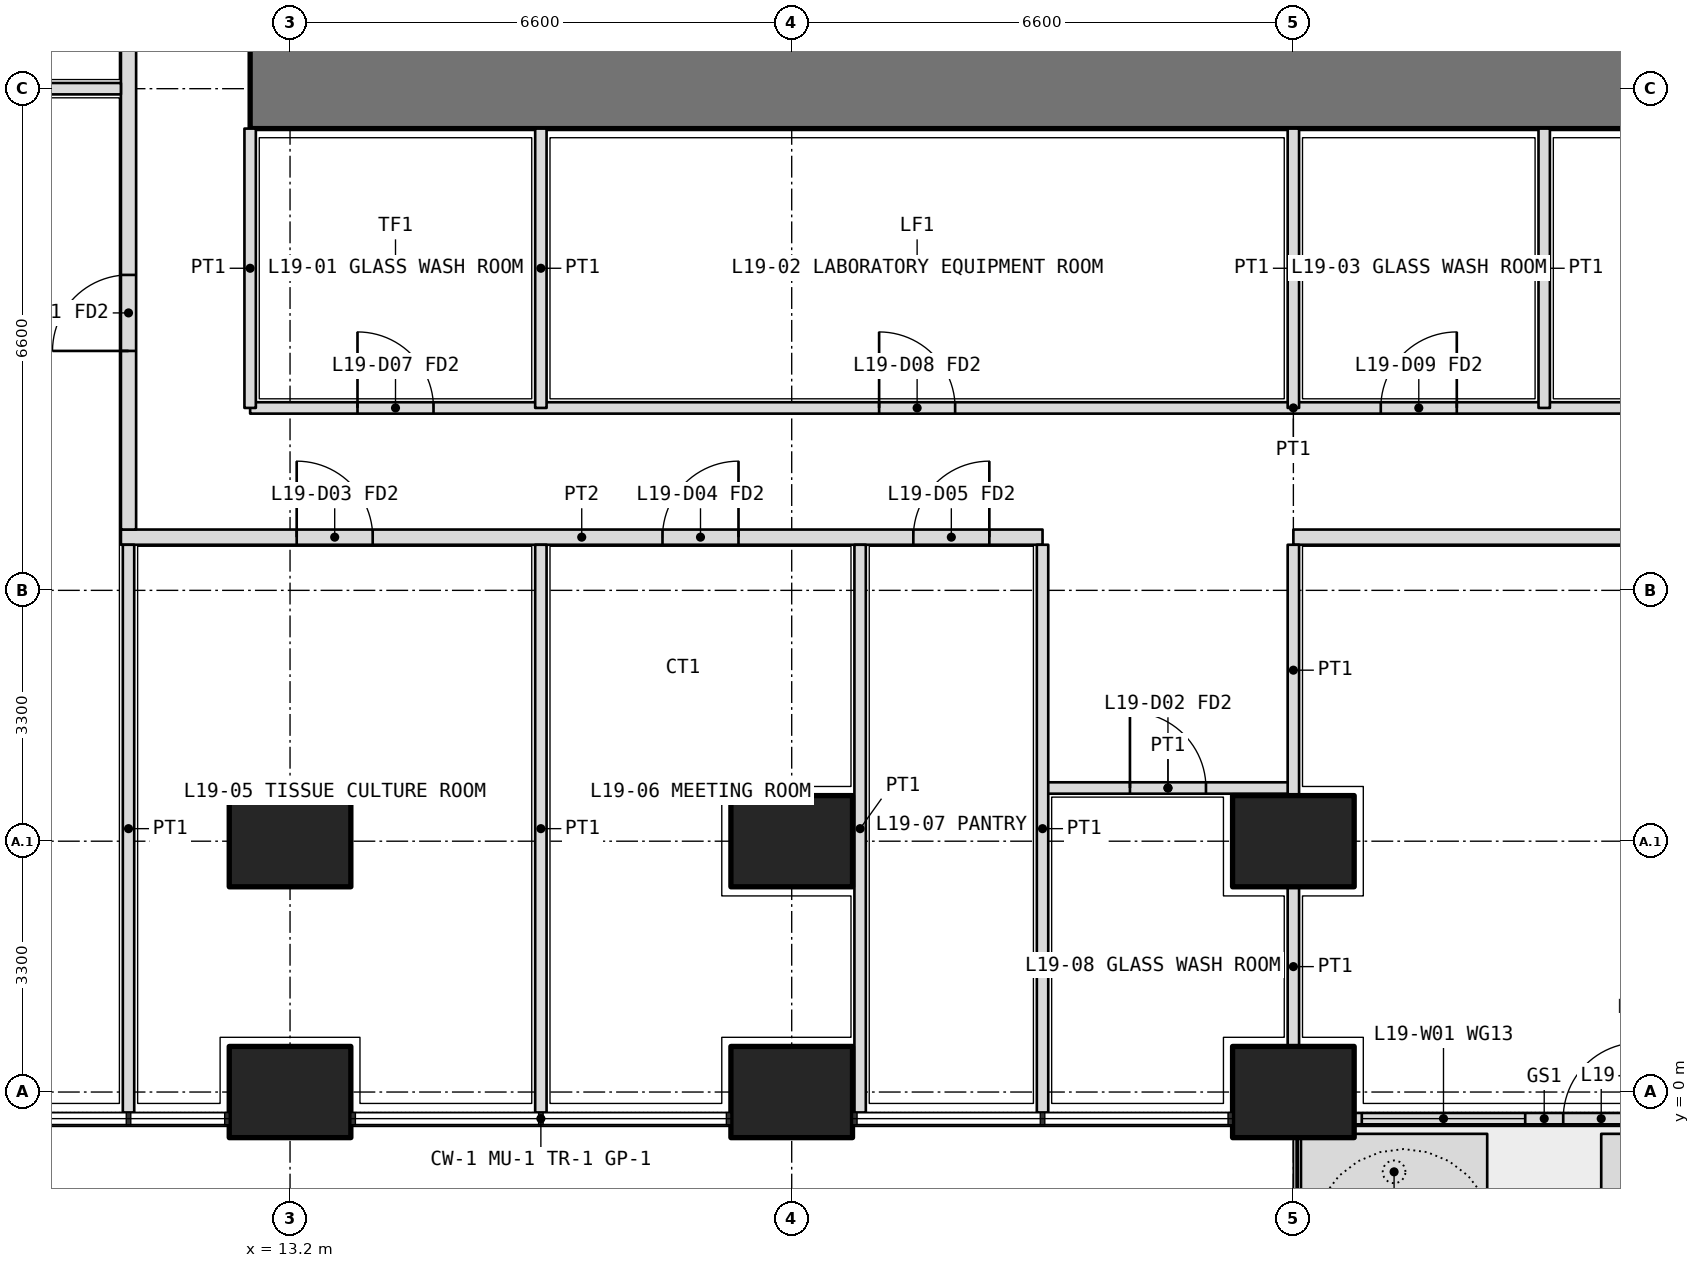
"""IFC4 building model, lengths in metres.
Left out: names, types, materials, properties, quantities, classifications, styles, units other than length and angle.
Written with IfcOpenShell. Run it as: python <this file> out.ifc"""

import sys

from ifc_helpers import new_model, si_unit, direction, frame, frame_2d, origin, origin_2d, place, context, subcontext, project, spatial, polyline, rectangle, outline, extrude, element, fill, save


model = new_model("IFC4")
c1 = context("Model", 3, precision=1e-05, world=origin(), true_north=direction((0.0, 1.0)))
c2 = subcontext(c1, "Body", "Model", "MODEL_VIEW")
j1 = project(units=[si_unit("LENGTHUNIT", "METRE"), si_unit("PLANEANGLEUNIT", "RADIAN")], contexts=[c1])
p1 = place(None, origin())
s1 = spatial("IfcSite", under=j1, at=p1, CompositionType="ELEMENT")
p2 = place(p1, origin())
s2 = spatial("IfcBuilding", under=s1, at=p2, CompositionType="ELEMENT")
p3 = place(p2, frame((0.0, 0.0, 86.4)))
s3 = spatial("IfcBuildingStorey", under=s2, at=p3, CompositionType="ELEMENT", Elevation=86.4)
for number, where, z_axis, x_axis in (
    (1, (13.2, 0.0, 0.0), (0.0, 0.0, 1.0), (1.0, 0.0, 0.0)),
    (2, (19.8, 0.0, 0.0), (0.0, 0.0, 1.0), (1.0, 0.0, 0.0)),
    (3, (26.4, 0.0, 0.0), (0.0, 0.0, 1.0), (1.0, 0.0, 0.0)),
    (4, (13.2, 3.3, 0.0), (0.0, 0.0, 1.0), (1.0, 0.0, 0.0)),
    (5, (19.8, 3.3, 0.0), (0.0, 0.0, 1.0), (1.0, 0.0, 0.0)),
    (6, (26.4, 3.3, 0.0), (0.0, 0.0, 1.0), (1.0, 0.0, 0.0)),
):
    element("IfcColumn", number, at=place(p3, frame(where, z_axis=z_axis, x_axis=x_axis)), inside=s3, PredefinedType="COLUMN", context=c2, shape_type="SweptSolid", body=[
        extrude(rectangle(XDim=1.6, YDim=1.2, at=origin_2d()), origin(), (0.0, 0.0, 1.0), 4.2),
    ])
p4 = place(p3, origin())
e7 = element("IfcWall", 7, at=p4, inside=s3, PredefinedType="USERDEFINED", context=c2, shape_type="SweptSolid", body=[
    extrude(outline(polyline([(26.5, -1.55), (28.95, -1.55), (28.95, -0.55), (26.5, -0.55), (26.5, -1.55)]), holes=[polyline([(26.65, -1.4), (28.8, -1.4), (28.8, -0.7), (26.65, -0.7), (26.65, -1.4)])]), origin(), (0.0, 0.0, 1.0), 1.05),
])
p5 = place(p3, origin())
e8 = element("IfcWall", 8, at=p5, inside=s3, PredefinedType="USERDEFINED", context=c2, shape_type="SweptSolid", body=[
    extrude(outline(polyline([(30.45, -1.55), (39.5, -1.55), (39.5, -0.55), (30.45, -0.55), (30.45, -1.55)]), holes=[polyline([(30.6, -1.4), (39.35, -1.4), (39.35, -0.7), (30.6, -0.7), (30.6, -1.4)])]), origin(), (0.0, 0.0, 1.0), 1.05),
])
p6 = place(p3, frame((27.2, -0.35, 0.0), z_axis=(0.0, 0.0, 1.0), x_axis=(1.0, 0.0, 0.0)))
e9 = element("IfcWall", 9, at=p6, inside=s3, PredefinedType="SOLIDWALL", context=c2, shape_type="SweptSolid", body=[
    extrude(rectangle(XDim=5.0, YDim=0.15, at=frame_2d((2.5, 0.0))), origin(), (0.0, 0.0, 1.0), 2.7),
])
p7 = place(p6, frame((2.75, 0.0, 0.0)))
e10 = element("IfcOpeningElement", 10, at=p7, cuts=e9, PredefinedType="OPENING", context=c2, shape_type="SweptSolid", body=[
    extrude(rectangle(XDim=1.0, YDim=2.4, at=frame_2d((0.5, 1.2))), frame((0.0, 0.085, 0.0), z_axis=(0.0, -1.0, 0.0), x_axis=(1.0, 0.0, 0.0)), (0.0, 0.0, 1.0), 0.17),
])
p8 = place(p6, frame((0.1, 0.0, 0.1)))
e11 = element("IfcOpeningElement", 11, at=p8, cuts=e9, PredefinedType="OPENING", context=c2, shape_type="SweptSolid", body=[
    extrude(rectangle(XDim=2.15, YDim=2.3, at=frame_2d((1.075, 1.15))), frame((0.0, 0.085, 0.0), z_axis=(0.0, -1.0, 0.0), x_axis=(1.0, 0.0, 0.0)), (0.0, 0.0, 1.0), 0.17),
])
p9 = place(p6, frame((3.85, 0.0, 0.1)))
e12 = element("IfcOpeningElement", 12, at=p9, cuts=e9, PredefinedType="OPENING", context=c2, shape_type="SweptSolid", body=[
    extrude(rectangle(XDim=1.05, YDim=2.3, at=frame_2d((0.525, 1.15))), frame((0.0, 0.085, 0.0), z_axis=(0.0, -1.0, 0.0), x_axis=(1.0, 0.0, 0.0)), (0.0, 0.0, 1.0), 0.17),
])
p10 = place(p3, frame((12.675, 13.2, 0.0), z_axis=(0.0, 0.0, 1.0), x_axis=(1.0, 0.0, 0.0)))
e13 = element("IfcWall", 13, at=p10, inside=s3, PredefinedType="SHEAR", context=c2, shape_type="SweptSolid", body=[
    extrude(rectangle(XDim=27.45, YDim=1.05, at=frame_2d((13.725, 0.0))), origin(), (0.0, 0.0, 1.0), 4.2),
])
p11 = place(p3, frame((12.675, 9.0, 0.0), z_axis=(0.0, 0.0, 1.0), x_axis=(1.0, 0.0, 0.0)))
e14 = element("IfcWall", 14, at=p11, inside=s3, PredefinedType="PARTITIONING", context=c2, shape_type="SweptSolid", body=[
    extrude(rectangle(XDim=27.45, YDim=0.15, at=frame_2d((13.725, 0.0))), origin(), (0.0, 0.0, 1.0), 2.85),
])
p12 = place(p11, frame((1.413, 0.0, 0.0)))
e15 = element("IfcOpeningElement", 15, at=p12, cuts=e14, PredefinedType="OPENING", context=c2, shape_type="SweptSolid", body=[
    extrude(rectangle(XDim=1.0, YDim=2.1, at=frame_2d((0.5, 1.05))), frame((0.0, 0.085, 0.0), z_axis=(0.0, -1.0, 0.0), x_axis=(1.0, 0.0, 0.0)), (0.0, 0.0, 1.0), 0.17),
])
p13 = place(p11, frame((8.275, 0.0, 0.0)))
e16 = element("IfcOpeningElement", 16, at=p13, cuts=e14, PredefinedType="OPENING", context=c2, shape_type="SweptSolid", body=[
    extrude(rectangle(XDim=1.0, YDim=2.1, at=frame_2d((0.5, 1.05))), frame((0.0, 0.085, 0.0), z_axis=(0.0, -1.0, 0.0), x_axis=(1.0, 0.0, 0.0)), (0.0, 0.0, 1.0), 0.17),
])
p14 = place(p11, frame((14.875, 0.0, 0.0)))
e17 = element("IfcOpeningElement", 17, at=p14, cuts=e14, PredefinedType="OPENING", context=c2, shape_type="SweptSolid", body=[
    extrude(rectangle(XDim=1.0, YDim=2.1, at=frame_2d((0.5, 1.05))), frame((0.0, 0.085, 0.0), z_axis=(0.0, -1.0, 0.0), x_axis=(1.0, 0.0, 0.0)), (0.0, 0.0, 1.0), 0.17),
])
p15 = place(p11, frame((21.738, 0.0, 0.0)))
e18 = element("IfcOpeningElement", 18, at=p15, cuts=e14, PredefinedType="OPENING", context=c2, shape_type="SweptSolid", body=[
    extrude(rectangle(XDim=1.0, YDim=2.1, at=frame_2d((0.5, 1.05))), frame((0.0, 0.085, 0.0), z_axis=(0.0, -1.0, 0.0), x_axis=(1.0, 0.0, 0.0)), (0.0, 0.0, 1.0), 0.17),
])
p16 = place(p3, frame((12.675, 12.675, 0.0), z_axis=(0.0, 0.0, 1.0), x_axis=(0.0, -1.0, 0.0)))
e19 = element("IfcWall", 19, at=p16, inside=s3, PredefinedType="PARTITIONING", context=c2, shape_type="SweptSolid", body=[
    extrude(rectangle(XDim=3.675, YDim=0.15, at=frame_2d((1.837, 0.0))), origin(), (0.0, 0.0, 1.0), 2.85),
])
p17 = place(p3, frame((16.5, 12.675, 0.0), z_axis=(0.0, 0.0, 1.0), x_axis=(0.0, -1.0, 0.0)))
e20 = element("IfcWall", 20, at=p17, inside=s3, PredefinedType="PARTITIONING", context=c2, shape_type="SweptSolid", body=[
    extrude(rectangle(XDim=3.675, YDim=0.15, at=frame_2d((1.837, 0.0))), origin(), (0.0, 0.0, 1.0), 3.9),
])
p18 = place(p3, frame((26.4, 12.675, 0.0), z_axis=(0.0, 0.0, 1.0), x_axis=(0.0, -1.0, 0.0)))
e21 = element("IfcWall", 21, at=p18, inside=s3, PredefinedType="PARTITIONING", context=c2, shape_type="SweptSolid", body=[
    extrude(rectangle(XDim=3.675, YDim=0.15, at=frame_2d((1.837, 0.0))), origin(), (0.0, 0.0, 1.0), 2.85),
])
p19 = place(p3, frame((29.7, 12.675, 0.0), z_axis=(0.0, 0.0, 1.0), x_axis=(0.0, -1.0, 0.0)))
e22 = element("IfcWall", 22, at=p19, inside=s3, PredefinedType="PARTITIONING", context=c2, shape_type="SweptSolid", body=[
    extrude(rectangle(XDim=3.675, YDim=0.15, at=frame_2d((1.837, 0.0))), origin(), (0.0, 0.0, 1.0), 3.9),
])
p20 = place(p3, frame((10.975, 7.3, 0.0), z_axis=(0.0, 0.0, 1.0), x_axis=(1.0, 0.0, 0.0)))
e23 = element("IfcWall", 23, at=p20, inside=s3, PredefinedType="PARTITIONING", context=c2, shape_type="SweptSolid", body=[
    extrude(rectangle(XDim=12.125, YDim=0.2, at=frame_2d((6.062, 0.0))), origin(), (0.0, 0.0, 1.0), 2.85),
])
p21 = place(p20, frame((2.312, 0.0, 0.0)))
e24 = element("IfcOpeningElement", 24, at=p21, cuts=e23, PredefinedType="OPENING", context=c2, shape_type="SweptSolid", body=[
    extrude(rectangle(XDim=1.0, YDim=2.1, at=frame_2d((0.5, 1.05))), frame((0.0, 0.11, 0.0), z_axis=(0.0, -1.0, 0.0), x_axis=(1.0, 0.0, 0.0)), (0.0, 0.0, 1.0), 0.22),
])
p22 = place(p20, frame((7.125, 0.0, 0.0)))
e25 = element("IfcOpeningElement", 25, at=p22, cuts=e23, PredefinedType="OPENING", context=c2, shape_type="SweptSolid", body=[
    extrude(rectangle(XDim=1.0, YDim=2.1, at=frame_2d((0.5, 1.05))), frame((0.0, 0.11, 0.0), z_axis=(0.0, -1.0, 0.0), x_axis=(1.0, 0.0, 0.0)), (0.0, 0.0, 1.0), 0.22),
])
p23 = place(p20, frame((10.425, 0.0, 0.0)))
e26 = element("IfcOpeningElement", 26, at=p23, cuts=e23, PredefinedType="OPENING", context=c2, shape_type="SweptSolid", body=[
    extrude(rectangle(XDim=1.0, YDim=2.1, at=frame_2d((0.5, 1.05))), frame((0.0, 0.11, 0.0), z_axis=(0.0, -1.0, 0.0), x_axis=(1.0, 0.0, 0.0)), (0.0, 0.0, 1.0), 0.22),
])
p24 = place(p3, frame((26.4, 7.3, 0.0), z_axis=(0.0, 0.0, 1.0), x_axis=(1.0, 0.0, 0.0)))
e27 = element("IfcWall", 27, at=p24, inside=s3, PredefinedType="PARTITIONING", context=c2, shape_type="SweptSolid", body=[
    extrude(rectangle(XDim=15.425, YDim=0.2, at=frame_2d((7.712, 0.0))), origin(), (0.0, 0.0, 1.0), 2.85),
])
p25 = place(p24, frame((7.163, 0.0, 0.0)))
e28 = element("IfcOpeningElement", 28, at=p25, cuts=e27, PredefinedType="OPENING", context=c2, shape_type="SweptSolid", body=[
    extrude(rectangle(XDim=1.0, YDim=2.1, at=frame_2d((0.5, 1.05))), frame((0.0, 0.11, 0.0), z_axis=(0.0, -1.0, 0.0), x_axis=(1.0, 0.0, 0.0)), (0.0, 0.0, 1.0), 0.22),
])
p26 = place(p3, frame((11.075, 7.4, 0.0), z_axis=(0.0, 0.0, 1.0), x_axis=(0.0, 1.0, 0.0)))
e29 = element("IfcWall", 29, at=p26, inside=s3, PredefinedType="PARTITIONING", context=c2, shape_type="SweptSolid", body=[
    extrude(rectangle(XDim=27.625, YDim=0.2, at=frame_2d((13.812, 0.0))), origin(), (0.0, 0.0, 1.0), 2.85),
])
p27 = place(p26, frame((2.35, 0.0, 0.0)))
e30 = element("IfcOpeningElement", 30, at=p27, cuts=e29, PredefinedType="OPENING", context=c2, shape_type="SweptSolid", body=[
    extrude(rectangle(XDim=1.0, YDim=2.1, at=frame_2d((0.5, 1.05))), frame((0.0, 0.11, 0.0), z_axis=(0.0, -1.0, 0.0), x_axis=(1.0, 0.0, 0.0)), (0.0, 0.0, 1.0), 0.22),
])
p28 = place(p26, frame((6.35, 0.0, 0.0)))
e31 = element("IfcOpeningElement", 31, at=p28, cuts=e29, PredefinedType="OPENING", context=c2, shape_type="SweptSolid", body=[
    extrude(rectangle(XDim=1.0, YDim=2.1, at=frame_2d((0.5, 1.05))), frame((0.0, 0.11, 0.0), z_axis=(0.0, -1.0, 0.0), x_axis=(1.0, 0.0, 0.0)), (0.0, 0.0, 1.0), 0.22),
])
p29 = place(p26, frame((9.425, 0.0, 0.0)))
e32 = element("IfcOpeningElement", 32, at=p29, cuts=e29, PredefinedType="OPENING", context=c2, shape_type="SweptSolid", body=[
    extrude(rectangle(XDim=0.9, YDim=2.1, at=frame_2d((0.45, 1.05))), frame((0.0, 0.11, 0.0), z_axis=(0.0, -1.0, 0.0), x_axis=(1.0, 0.0, 0.0)), (0.0, 0.0, 1.0), 0.22),
])
p30 = place(p26, frame((13.275, 0.0, 0.0)))
e33 = element("IfcOpeningElement", 33, at=p30, cuts=e29, PredefinedType="OPENING", context=c2, shape_type="SweptSolid", body=[
    extrude(rectangle(XDim=0.9, YDim=2.1, at=frame_2d((0.45, 1.05))), frame((0.0, 0.11, 0.0), z_axis=(0.0, -1.0, 0.0), x_axis=(1.0, 0.0, 0.0)), (0.0, 0.0, 1.0), 0.22),
])
p31 = place(p26, frame((16.8, 0.0, 0.0)))
e34 = element("IfcOpeningElement", 34, at=p31, cuts=e29, PredefinedType="OPENING", context=c2, shape_type="SweptSolid", body=[
    extrude(rectangle(XDim=1.0, YDim=2.1, at=frame_2d((0.5, 1.05))), frame((0.0, 0.11, 0.0), z_axis=(0.0, -1.0, 0.0), x_axis=(1.0, 0.0, 0.0)), (0.0, 0.0, 1.0), 0.22),
])
p32 = place(p26, frame((20.15, 0.0, 0.0)))
e35 = element("IfcOpeningElement", 35, at=p32, cuts=e29, PredefinedType="OPENING", context=c2, shape_type="SweptSolid", body=[
    extrude(rectangle(XDim=1.0, YDim=2.1, at=frame_2d((0.5, 1.05))), frame((0.0, 0.11, 0.0), z_axis=(0.0, -1.0, 0.0), x_axis=(1.0, 0.0, 0.0)), (0.0, 0.0, 1.0), 0.22),
])
p33 = place(p26, frame((23.45, 0.0, 0.0)))
e36 = element("IfcOpeningElement", 36, at=p33, cuts=e29, PredefinedType="OPENING", context=c2, shape_type="SweptSolid", body=[
    extrude(rectangle(XDim=1.0, YDim=2.1, at=frame_2d((0.5, 1.05))), frame((0.0, 0.11, 0.0), z_axis=(0.0, -1.0, 0.0), x_axis=(1.0, 0.0, 0.0)), (0.0, 0.0, 1.0), 0.22),
])
p34 = place(p26, frame((26.163, 0.0, 0.0)))
e37 = element("IfcOpeningElement", 37, at=p34, cuts=e29, PredefinedType="OPENING", context=c2, shape_type="SweptSolid", body=[
    extrude(rectangle(XDim=1.0, YDim=2.1, at=frame_2d((0.5, 1.05))), frame((0.0, 0.11, 0.0), z_axis=(0.0, -1.0, 0.0), x_axis=(1.0, 0.0, 0.0)), (0.0, 0.0, 1.0), 0.22),
])
for number, where, z_axis, x_axis in (
    (38, (11.075, -0.27, 0.0), (0.0, 0.0, 1.0), (0.0, 1.0, 0.0)),
    (39, (20.7, -0.27, 0.0), (0.0, 0.0, 1.0), (0.0, 1.0, 0.0)),
):
    element("IfcWall", number, at=place(p3, frame(where, z_axis=z_axis, x_axis=x_axis)), inside=s3, PredefinedType="PARTITIONING", context=c2, shape_type="SweptSolid", body=[
        extrude(rectangle(XDim=7.47, YDim=0.15, at=frame_2d((3.735, 0.0))), origin(), (0.0, 0.0, 1.0), 2.7),
    ])
p35 = place(p3, frame((23.1, 4.0, 0.0), z_axis=(0.0, 0.0, 1.0), x_axis=(1.0, 0.0, 0.0)))
e40 = element("IfcWall", 40, at=p35, inside=s3, PredefinedType="PARTITIONING", context=c2, shape_type="SweptSolid", body=[
    extrude(rectangle(XDim=3.3, YDim=0.15, at=frame_2d((1.65, 0.0))), origin(), (0.0, 0.0, 1.0), 2.85),
])
p36 = place(p35, frame((1.15, 0.0, 0.0)))
e41 = element("IfcOpeningElement", 41, at=p36, cuts=e40, PredefinedType="OPENING", context=c2, shape_type="SweptSolid", body=[
    extrude(rectangle(XDim=1.0, YDim=2.1, at=frame_2d((0.5, 1.05))), frame((0.0, 0.085, 0.0), z_axis=(0.0, -1.0, 0.0), x_axis=(1.0, 0.0, 0.0)), (0.0, 0.0, 1.0), 0.17),
])
for number, where, z_axis, x_axis in (
    (42, (16.5, -0.27, 0.0), (0.0, 0.0, 1.0), (0.0, 1.0, 0.0)),
    (43, (23.1, -0.27, 0.0), (0.0, 0.0, 1.0), (0.0, 1.0, 0.0)),
):
    element("IfcWall", number, at=place(p3, frame(where, z_axis=z_axis, x_axis=x_axis)), inside=s3, PredefinedType="PARTITIONING", context=c2, shape_type="SweptSolid", body=[
        extrude(rectangle(XDim=7.47, YDim=0.15, at=frame_2d((3.735, 0.0))), origin(), (0.0, 0.0, 1.0), 2.7),
    ])
p37 = place(p3, frame((26.4, 0.6, 0.0), z_axis=(0.0, 0.0, 1.0), x_axis=(0.0, 1.0, 0.0)))
e44 = element("IfcWall", 44, at=p37, inside=s3, PredefinedType="PARTITIONING", context=c2, shape_type="SweptSolid", body=[
    extrude(rectangle(XDim=2.1, YDim=0.15, at=frame_2d((1.05, 0.0))), origin(), (0.0, 0.0, 1.0), 2.85),
])
p38 = place(p3, frame((26.4, 3.9, 0.0), z_axis=(0.0, 0.0, 1.0), x_axis=(0.0, 1.0, 0.0)))
e45 = element("IfcWall", 45, at=p38, inside=s3, PredefinedType="PARTITIONING", context=c2, shape_type="SweptSolid", body=[
    extrude(rectangle(XDim=3.3, YDim=0.15, at=frame_2d((1.65, 0.0))), origin(), (0.0, 0.0, 1.0), 2.85),
])
p39 = place(p3, frame((7.2, 13.2, 0.0), z_axis=(0.0, 0.0, 1.0), x_axis=(1.0, 0.0, 0.0)))
e46 = element("IfcWall", 46, at=p39, inside=s3, PredefinedType="PARTITIONING", context=c2, shape_type="SweptSolid", body=[
    extrude(rectangle(XDim=3.775, YDim=0.15, at=frame_2d((1.888, 0.0))), origin(), (0.0, 0.0, 1.0), 2.85),
])
p40 = place(p7, origin())
e47 = element("IfcDoor", 47, at=p40, inside=s3, OperationType="SINGLE_SWING_RIGHT", PredefinedType="DOOR", context=c2, shape_type="SweptSolid", body=[
    extrude(rectangle(XDim=1.0, YDim=2.4, at=frame_2d((0.5, 1.2))), frame((0.0, 0.025, 0.0), z_axis=(0.0, -1.0, 0.0), x_axis=(1.0, 0.0, 0.0)), (0.0, 0.0, 1.0), 0.05),
])
fill(e10, e47)
p41 = place(p8, origin())
e48 = element("IfcWindow", 48, at=p41, inside=s3, PartitioningType="SINGLE_PANEL", PredefinedType="WINDOW", context=c2, shape_type="SweptSolid", body=[
    extrude(rectangle(XDim=2.15, YDim=2.3, at=frame_2d((1.075, 1.15))), frame((0.0, 0.03, 0.0), z_axis=(0.0, -1.0, 0.0), x_axis=(1.0, 0.0, 0.0)), (0.0, 0.0, 1.0), 0.06),
])
fill(e11, e48)
p42 = place(p12, origin())
e49 = element("IfcDoor", 49, at=p42, inside=s3, OperationType="SINGLE_SWING_LEFT", PredefinedType="DOOR", context=c2, shape_type="SweptSolid", body=[
    extrude(rectangle(XDim=1.0, YDim=2.1, at=frame_2d((0.5, 1.05))), frame((0.0, 0.025, 0.0), z_axis=(0.0, -1.0, 0.0), x_axis=(1.0, 0.0, 0.0)), (0.0, 0.0, 1.0), 0.05),
])
fill(e15, e49)
p43 = place(p13, origin())
e50 = element("IfcDoor", 50, at=p43, inside=s3, OperationType="SINGLE_SWING_LEFT", PredefinedType="DOOR", context=c2, shape_type="SweptSolid", body=[
    extrude(rectangle(XDim=1.0, YDim=2.1, at=frame_2d((0.5, 1.05))), frame((0.0, 0.025, 0.0), z_axis=(0.0, -1.0, 0.0), x_axis=(1.0, 0.0, 0.0)), (0.0, 0.0, 1.0), 0.05),
])
fill(e16, e50)
p44 = place(p14, origin())
e51 = element("IfcDoor", 51, at=p44, inside=s3, OperationType="SINGLE_SWING_RIGHT", PredefinedType="DOOR", context=c2, shape_type="SweptSolid", body=[
    extrude(rectangle(XDim=1.0, YDim=2.1, at=frame_2d((0.5, 1.05))), frame((0.0, 0.025, 0.0), z_axis=(0.0, -1.0, 0.0), x_axis=(1.0, 0.0, 0.0)), (0.0, 0.0, 1.0), 0.05),
])
fill(e17, e51)
p45 = place(p21, origin())
e52 = element("IfcDoor", 52, at=p45, inside=s3, OperationType="SINGLE_SWING_LEFT", PredefinedType="DOOR", context=c2, shape_type="SweptSolid", body=[
    extrude(rectangle(XDim=1.0, YDim=2.1, at=frame_2d((0.5, 1.05))), frame((0.0, 0.025, 0.0), z_axis=(0.0, -1.0, 0.0), x_axis=(1.0, 0.0, 0.0)), (0.0, 0.0, 1.0), 0.05),
])
fill(e24, e52)
p46 = place(p22, origin())
e53 = element("IfcDoor", 53, at=p46, inside=s3, OperationType="SINGLE_SWING_RIGHT", PredefinedType="DOOR", context=c2, shape_type="SweptSolid", body=[
    extrude(rectangle(XDim=1.0, YDim=2.1, at=frame_2d((0.5, 1.05))), frame((0.0, 0.025, 0.0), z_axis=(0.0, -1.0, 0.0), x_axis=(1.0, 0.0, 0.0)), (0.0, 0.0, 1.0), 0.05),
])
fill(e25, e53)
p47 = place(p23, origin())
e54 = element("IfcDoor", 54, at=p47, inside=s3, OperationType="SINGLE_SWING_RIGHT", PredefinedType="DOOR", context=c2, shape_type="SweptSolid", body=[
    extrude(rectangle(XDim=1.0, YDim=2.1, at=frame_2d((0.5, 1.05))), frame((0.0, 0.025, 0.0), z_axis=(0.0, -1.0, 0.0), x_axis=(1.0, 0.0, 0.0)), (0.0, 0.0, 1.0), 0.05),
])
fill(e26, e54)
p48 = place(p36, origin())
e55 = element("IfcDoor", 55, at=p48, inside=s3, OperationType="SINGLE_SWING_LEFT", PredefinedType="DOOR", context=c2, shape_type="SweptSolid", body=[
    extrude(rectangle(XDim=1.0, YDim=2.1, at=frame_2d((0.5, 1.05))), frame((0.0, 0.025, 0.0), z_axis=(0.0, -1.0, 0.0), x_axis=(1.0, 0.0, 0.0)), (0.0, 0.0, 1.0), 0.05),
])
fill(e41, e55)
p49 = place(p27, origin())
e56 = element("IfcDoor", 56, at=p49, inside=s3, OperationType="SINGLE_SWING_LEFT", PredefinedType="DOOR", context=c2, shape_type="SweptSolid", body=[
    extrude(rectangle(XDim=1.0, YDim=2.1, at=frame_2d((0.5, 1.05))), frame((0.0, 0.025, 0.0), z_axis=(0.0, -1.0, 0.0), x_axis=(1.0, 0.0, 0.0)), (0.0, 0.0, 1.0), 0.05),
])
fill(e30, e56)
save(model, sys.argv[1])
